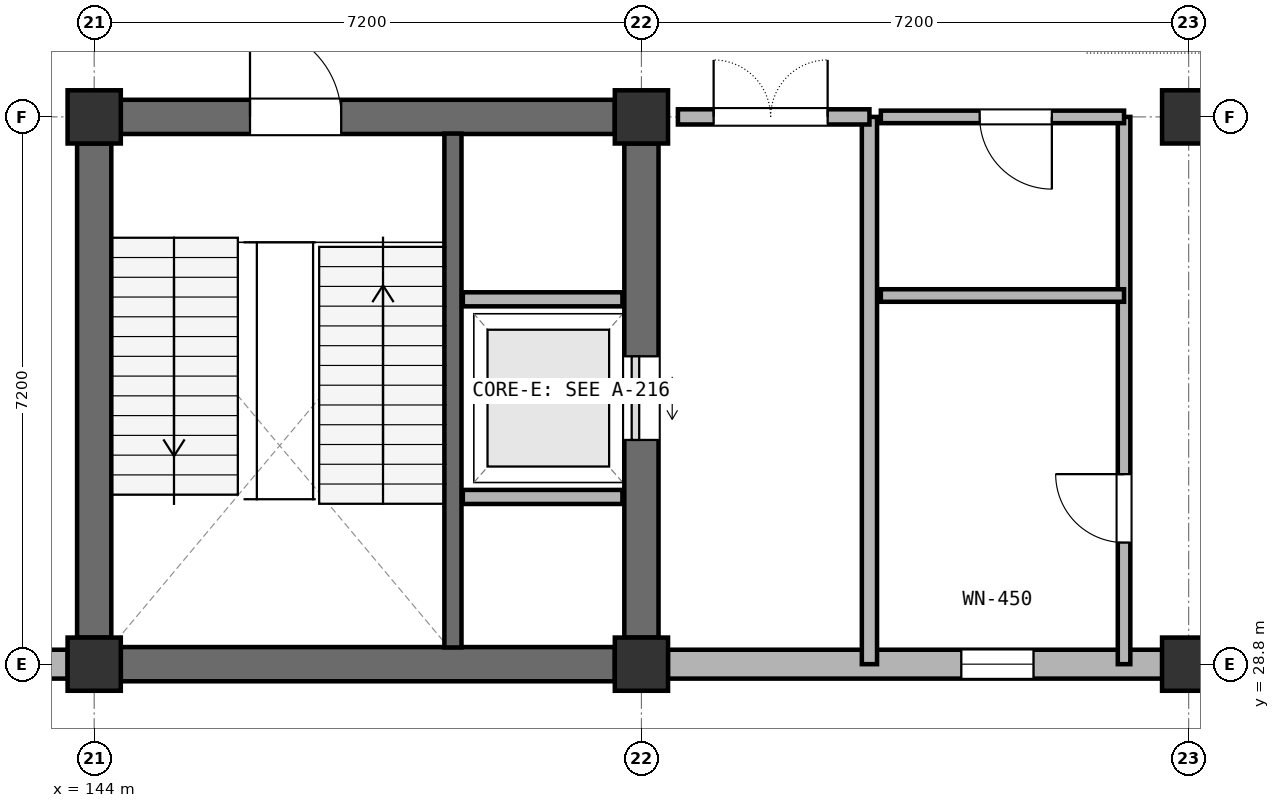
"""IFC4 building model, lengths in metres.
Left out: names, types, materials, properties, quantities, classifications, styles, units other than length and angle.
Written with IfcOpenShell. Run it as: python <this file> out.ifc"""

import sys

from ifc_helpers import new_model, si_unit, direction, frame, frame_2d, origin, origin_2d, place, context, subcontext, project, spatial, rectangle, extrude, element, fill, save


model = new_model("IFC4")
c1 = context("Model", 3, precision=1e-05, world=origin(), true_north=direction((0.0, 1.0)))
c2 = subcontext(c1, "Body", "Model", "MODEL_VIEW")
j1 = project(units=[si_unit("LENGTHUNIT", "METRE"), si_unit("PLANEANGLEUNIT", "RADIAN")], contexts=[c1])
p1 = place(None, origin())
s1 = spatial("IfcSite", under=j1, at=p1, CompositionType="ELEMENT")
p2 = place(p1, origin())
s2 = spatial("IfcBuilding", under=s1, at=p2, CompositionType="ELEMENT")
p3 = place(p2, frame((0.0, 0.0, 5.4)))
s3 = spatial("IfcBuildingStorey", under=s2, at=p3, CompositionType="ELEMENT", Elevation=5.4)
for number, where, z_axis, x_axis in (
    (1, (144.0, 28.8, 0.0), (0.0, 0.0, 1.0), (1.0, 0.0, 0.0)),
    (2, (144.0, 36.0, 0.0), (0.0, 0.0, 1.0), (1.0, 0.0, 0.0)),
    (3, (151.2, 28.8, 0.0), (0.0, 0.0, 1.0), (1.0, 0.0, 0.0)),
    (4, (151.2, 36.0, 0.0), (0.0, 0.0, 1.0), (1.0, 0.0, 0.0)),
    (5, (158.4, 28.8, 0.0), (0.0, 0.0, 1.0), (1.0, 0.0, 0.0)),
    (6, (158.4, 36.0, 0.0), (0.0, 0.0, 1.0), (1.0, 0.0, 0.0)),
):
    element("IfcColumn", number, at=place(p3, frame(where, z_axis=z_axis, x_axis=x_axis)), inside=s3, PredefinedType="COLUMN", context=c2, shape_type="SweptSolid", body=[
        extrude(rectangle(XDim=0.7, YDim=0.7, at=origin_2d()), origin(), (0.0, 0.0, 1.0), 4.8),
    ])
p4 = place(p3, frame((144.35, 28.8, 0.0), z_axis=(0.0, 0.0, 1.0), x_axis=(1.0, 0.0, 0.0)))
e7 = element("IfcWall", 7, at=p4, inside=s3, PredefinedType="SHEAR", context=c2, shape_type="SweptSolid", body=[
    extrude(rectangle(XDim=6.5, YDim=0.45, at=frame_2d((3.25, 0.0))), origin(), (0.0, 0.0, 1.0), 4.8),
])
p5 = place(p3, frame((151.2, 29.15, 0.0), z_axis=(0.0, 0.0, 1.0), x_axis=(0.0, 1.0, 0.0)))
e8 = element("IfcWall", 8, at=p5, inside=s3, PredefinedType="SHEAR", context=c2, shape_type="SweptSolid", body=[
    extrude(rectangle(XDim=6.5, YDim=0.45, at=frame_2d((3.25, 0.0))), origin(), (0.0, 0.0, 1.0), 4.8),
])
p6 = place(p5, frame((2.6, 0.0, 0.0)))
e9 = element("IfcOpeningElement", 9, at=p6, cuts=e8, PredefinedType="OPENING", context=c2, shape_type="SweptSolid", body=[
    extrude(rectangle(XDim=1.1, YDim=2.2, at=frame_2d((0.55, 1.1))), frame((0.0, 0.235, 0.0), z_axis=(0.0, -1.0, 0.0), x_axis=(1.0, 0.0, 0.0)), (0.0, 0.0, 1.0), 0.47),
])
p7 = place(p3, frame((150.85, 36.0, 0.0), z_axis=(0.0, 0.0, 1.0), x_axis=(-1.0, 0.0, 0.0)))
e10 = element("IfcWall", 10, at=p7, inside=s3, PredefinedType="SHEAR", context=c2, shape_type="SweptSolid", body=[
    extrude(rectangle(XDim=6.5, YDim=0.45, at=frame_2d((3.25, 0.0))), origin(), (0.0, 0.0, 1.0), 4.8),
])
p8 = place(p7, frame((3.6, 0.0, 0.0)))
e11 = element("IfcOpeningElement", 11, at=p8, cuts=e10, PredefinedType="OPENING", context=c2, shape_type="SweptSolid", body=[
    extrude(rectangle(XDim=1.2, YDim=2.2, at=frame_2d((0.6, 1.1))), frame((0.0, 0.235, 0.0), z_axis=(0.0, -1.0, 0.0), x_axis=(1.0, 0.0, 0.0)), (0.0, 0.0, 1.0), 0.47),
])
p9 = place(p3, frame((144.0, 35.65, 0.0), z_axis=(0.0, 0.0, 1.0), x_axis=(0.0, -1.0, 0.0)))
e12 = element("IfcWall", 12, at=p9, inside=s3, PredefinedType="SHEAR", context=c2, shape_type="SweptSolid", body=[
    extrude(rectangle(XDim=6.5, YDim=0.45, at=frame_2d((3.25, 0.0))), origin(), (0.0, 0.0, 1.0), 4.8),
])
p10 = place(p3, frame((148.72, 29.02, 0.0), z_axis=(0.0, 0.0, 1.0), x_axis=(0.0, 1.0, 0.0)))
e13 = element("IfcWall", 13, at=p10, inside=s3, PredefinedType="SHEAR", context=c2, shape_type="SweptSolid", body=[
    extrude(rectangle(XDim=6.76, YDim=0.225, at=frame_2d((3.38, 0.0))), origin(), (0.0, 0.0, 1.0), 4.8),
])
for number, where, z_axis, x_axis in (
    (14, (148.85, 31.0, 0.0), (0.0, 0.0, 1.0), (1.0, 0.0, 0.0)),
    (15, (148.85, 33.6, 0.0), (0.0, 0.0, 1.0), (1.0, 0.0, 0.0)),
):
    element("IfcWall", number, at=place(p3, frame(where, z_axis=z_axis, x_axis=x_axis)), inside=s3, PredefinedType="PARTITIONING", context=c2, shape_type="SweptSolid", body=[
        extrude(rectangle(XDim=2.1, YDim=0.185, at=frame_2d((1.05, 0.0))), origin(), (0.0, 0.0, 1.0), 4.8),
    ])
p11 = place(p3, frame((137.148, 28.8, 0.0), z_axis=(0.0, 0.0, 1.0), x_axis=(1.0, 0.0, 0.0)))
e16 = element("IfcWall", 16, at=p11, inside=s3, PredefinedType="SOLIDWALL", context=c2, shape_type="SweptSolid", body=[
    extrude(rectangle(XDim=6.504, YDim=0.38, at=frame_2d((3.252, 0.0))), origin(), (0.0, 0.0, 1.0), 3.5),
])
p12 = place(p11, frame((2.752, 0.0, 0.7)))
e17 = element("IfcOpeningElement", 17, at=p12, cuts=e16, PredefinedType="OPENING", context=c2, shape_type="SweptSolid", body=[
    extrude(rectangle(XDim=0.95, YDim=2.15, at=frame_2d((0.475, 1.075))), frame((0.0, 0.2, 0.0), z_axis=(0.0, -1.0, 0.0), x_axis=(1.0, 0.0, 0.0)), (0.0, 0.0, 1.0), 0.4),
])
p13 = place(p3, frame((151.548, 28.8, 0.0), z_axis=(0.0, 0.0, 1.0), x_axis=(1.0, 0.0, 0.0)))
e18 = element("IfcWall", 18, at=p13, inside=s3, PredefinedType="SOLIDWALL", context=c2, shape_type="SweptSolid", body=[
    extrude(rectangle(XDim=6.504, YDim=0.38, at=frame_2d((3.252, 0.0))), origin(), (0.0, 0.0, 1.0), 3.5),
])
p14 = place(p13, frame((3.861, 0.0, 0.7)))
e19 = element("IfcOpeningElement", 19, at=p14, cuts=e18, PredefinedType="OPENING", context=c2, shape_type="SweptSolid", body=[
    extrude(rectangle(XDim=0.95, YDim=2.15, at=frame_2d((0.475, 1.075))), frame((0.0, 0.2, 0.0), z_axis=(0.0, -1.0, 0.0), x_axis=(1.0, 0.0, 0.0)), (0.0, 0.0, 1.0), 0.4),
])
p15 = place(p3, frame((154.2, 28.8, 0.0), z_axis=(0.0, 0.0, 1.0), x_axis=(0.0, 1.0, 0.0)))
e20 = element("IfcWall", 20, at=p15, inside=s3, PredefinedType="PARTITIONING", context=c2, shape_type="SweptSolid", body=[
    extrude(rectangle(XDim=7.2, YDim=0.2, at=frame_2d((3.6, 0.0))), origin(), (0.0, 0.0, 1.0), 3.52),
])
p16 = place(p3, frame((154.2, 36.0, 0.0), z_axis=(0.0, 0.0, 1.0), x_axis=(-1.0, 0.0, 0.0)))
e21 = element("IfcWall", 21, at=p16, inside=s3, PredefinedType="PARTITIONING", context=c2, shape_type="SweptSolid", body=[
    extrude(rectangle(XDim=2.52, YDim=0.2, at=frame_2d((1.26, 0.0))), origin(), (0.0, 0.0, 1.0), 3.52),
])
p17 = place(p16, frame((0.55, 0.0, 0.0)))
e22 = element("IfcOpeningElement", 22, at=p17, cuts=e21, PredefinedType="OPENING", context=c2, shape_type="SweptSolid", body=[
    extrude(rectangle(XDim=1.5, YDim=2.2, at=frame_2d((0.75, 1.1))), frame((0.0, 0.11, 0.0), z_axis=(0.0, -1.0, 0.0), x_axis=(1.0, 0.0, 0.0)), (0.0, 0.0, 1.0), 0.22),
])
p18 = place(p3, frame((157.55, 28.8, 0.0), z_axis=(0.0, 0.0, 1.0), x_axis=(0.0, 1.0, 0.0)))
e23 = element("IfcWall", 23, at=p18, inside=s3, PredefinedType="PARTITIONING", context=c2, shape_type="SweptSolid", body=[
    extrude(rectangle(XDim=7.2, YDim=0.165, at=frame_2d((3.6, 0.0))), origin(), (0.0, 0.0, 1.0), 3.52),
])
p19 = place(p18, frame((1.6, 0.0, 0.0)))
e24 = element("IfcOpeningElement", 24, at=p19, cuts=e23, PredefinedType="OPENING", context=c2, shape_type="SweptSolid", body=[
    extrude(rectangle(XDim=0.9, YDim=2.15, at=frame_2d((0.45, 1.075))), frame((0.0, 0.093, 0.0), z_axis=(0.0, -1.0, 0.0), x_axis=(1.0, 0.0, 0.0)), (0.0, 0.0, 1.0), 0.185),
])
p20 = place(p3, frame((157.55, 36.0, 0.0), z_axis=(0.0, 0.0, 1.0), x_axis=(-1.0, 0.0, 0.0)))
e25 = element("IfcWall", 25, at=p20, inside=s3, PredefinedType="PARTITIONING", context=c2, shape_type="SweptSolid", body=[
    extrude(rectangle(XDim=3.2, YDim=0.165, at=frame_2d((1.6, 0.0))), origin(), (0.0, 0.0, 1.0), 3.52),
])
p21 = place(p20, frame((0.95, 0.0, 0.0)))
e26 = element("IfcOpeningElement", 26, at=p21, cuts=e25, PredefinedType="OPENING", context=c2, shape_type="SweptSolid", body=[
    extrude(rectangle(XDim=0.95, YDim=2.15, at=frame_2d((0.475, 1.075))), frame((0.0, 0.093, 0.0), z_axis=(0.0, -1.0, 0.0), x_axis=(1.0, 0.0, 0.0)), (0.0, 0.0, 1.0), 0.185),
])
p22 = place(p3, frame((154.35, 33.65, 0.0), z_axis=(0.0, 0.0, 1.0), x_axis=(1.0, 0.0, 0.0)))
e27 = element("IfcWall", 27, at=p22, inside=s3, PredefinedType="PARTITIONING", context=c2, shape_type="SweptSolid", body=[
    extrude(rectangle(XDim=3.2, YDim=0.165, at=frame_2d((1.6, 0.0))), origin(), (0.0, 0.0, 1.0), 3.52),
])
p23 = place(p6, origin())
e28 = element("IfcDoor", 28, at=p23, inside=s3, OperationType="SLIDING_TO_LEFT", PredefinedType="DOOR", context=c2, shape_type="SweptSolid", body=[
    extrude(rectangle(XDim=1.1, YDim=2.2, at=frame_2d((0.55, 1.1))), frame((0.0, 0.025, 0.0), z_axis=(0.0, -1.0, 0.0), x_axis=(1.0, 0.0, 0.0)), (0.0, 0.0, 1.0), 0.05),
])
fill(e9, e28)
p24 = place(p14, origin())
e29 = element("IfcWindow", 29, at=p24, inside=s3, PartitioningType="SINGLE_PANEL", PredefinedType="WINDOW", context=c2, shape_type="SweptSolid", body=[
    extrude(rectangle(XDim=0.95, YDim=2.15, at=frame_2d((0.475, 1.075))), frame((0.0, 0.03, 0.0), z_axis=(0.0, -1.0, 0.0), x_axis=(1.0, 0.0, 0.0)), (0.0, 0.0, 1.0), 0.06),
])
fill(e19, e29)
p25 = place(p8, frame((1.2, 0.0, 0.0), z_axis=(0.0, 0.0, 1.0), x_axis=(-1.0, 0.0, 0.0)))
e30 = element("IfcDoor", 30, at=p25, inside=s3, OperationType="SINGLE_SWING_LEFT", PredefinedType="DOOR", context=c2, shape_type="SweptSolid", body=[
    extrude(rectangle(XDim=1.2, YDim=2.2, at=frame_2d((0.6, 1.1))), frame((0.0, 0.025, 0.0), z_axis=(0.0, -1.0, 0.0), x_axis=(1.0, 0.0, 0.0)), (0.0, 0.0, 1.0), 0.05),
])
fill(e11, e30)
p26 = place(p17, frame((1.5, 0.0, 0.0), z_axis=(0.0, 0.0, 1.0), x_axis=(-1.0, 0.0, 0.0)))
e31 = element("IfcDoor", 31, at=p26, inside=s3, OperationType="DOUBLE_DOOR_SINGLE_SWING", PredefinedType="DOOR", context=c2, shape_type="SweptSolid", body=[
    extrude(rectangle(XDim=1.5, YDim=2.2, at=frame_2d((0.75, 1.1))), frame((0.0, 0.025, 0.0), z_axis=(0.0, -1.0, 0.0), x_axis=(1.0, 0.0, 0.0)), (0.0, 0.0, 1.0), 0.05),
])
fill(e22, e31)
p27 = place(p19, origin())
e32 = element("IfcDoor", 32, at=p27, inside=s3, OperationType="SINGLE_SWING_RIGHT", PredefinedType="DOOR", context=c2, shape_type="SweptSolid", body=[
    extrude(rectangle(XDim=0.9, YDim=2.15, at=frame_2d((0.45, 1.075))), frame((0.0, 0.025, 0.0), z_axis=(0.0, -1.0, 0.0), x_axis=(1.0, 0.0, 0.0)), (0.0, 0.0, 1.0), 0.05),
])
fill(e24, e32)
p28 = place(p21, origin())
e33 = element("IfcDoor", 33, at=p28, inside=s3, OperationType="SINGLE_SWING_LEFT", PredefinedType="DOOR", context=c2, shape_type="SweptSolid", body=[
    extrude(rectangle(XDim=0.95, YDim=2.15, at=frame_2d((0.475, 1.075))), frame((0.0, 0.025, 0.0), z_axis=(0.0, -1.0, 0.0), x_axis=(1.0, 0.0, 0.0)), (0.0, 0.0, 1.0), 0.05),
])
fill(e26, e33)
save(model, sys.argv[1])
